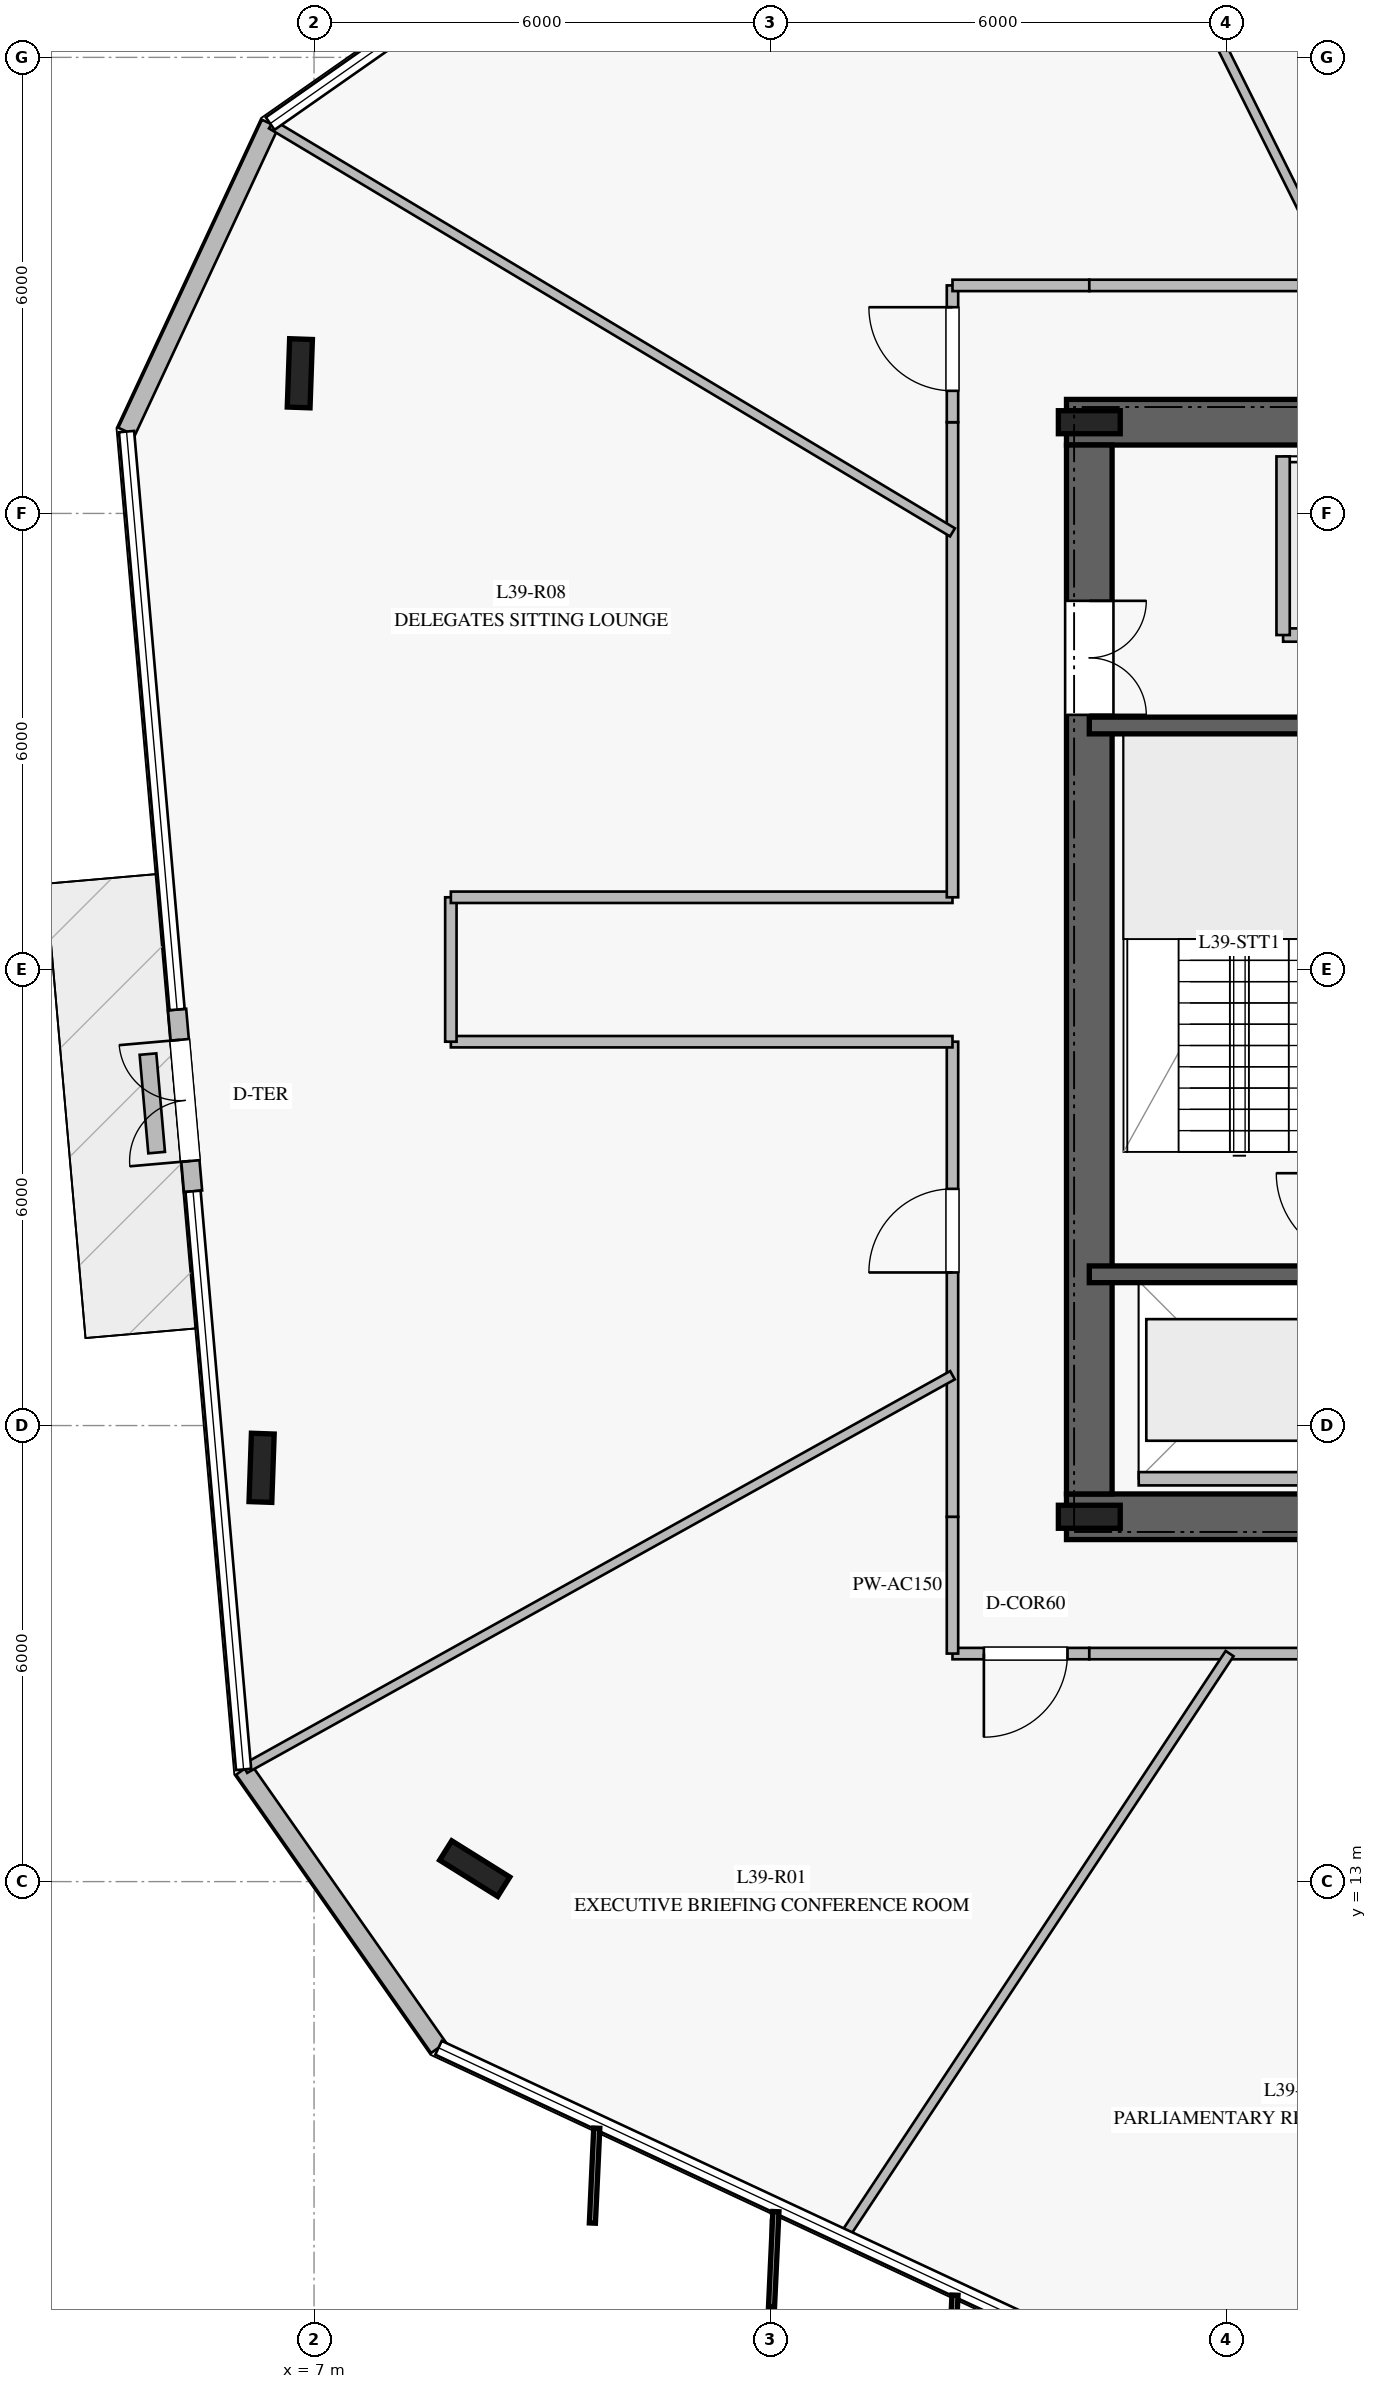
"""IFC4 building model, lengths in metres.
Left out: names, types, materials, properties, quantities, classifications, styles, units other than length and angle.
Written with IfcOpenShell. Run it as: python <this file> out.ifc"""

import sys

from ifc_helpers import new_model, si_unit, direction, frame, frame_2d, origin, origin_2d, place, context, subcontext, project, spatial, rectangle, i_section, extrude, element, fill, save


model = new_model("IFC4")
c1 = context("Model", 3, precision=1e-05, world=origin(), true_north=direction((0.0, 1.0)))
c2 = subcontext(c1, "Body", "Model", "MODEL_VIEW")
j1 = project(units=[si_unit("LENGTHUNIT", "METRE"), si_unit("PLANEANGLEUNIT", "RADIAN")], contexts=[c1])
p1 = place(None, origin())
s1 = spatial("IfcSite", under=j1, at=p1, CompositionType="ELEMENT")
p2 = place(p1, origin())
s2 = spatial("IfcBuilding", under=s1, at=p2, CompositionType="ELEMENT")
p3 = place(p2, frame((0.0, 0.0, 162.4)))
s3 = spatial("IfcBuildingStorey", under=s2, at=p3, CompositionType="ELEMENT", Elevation=162.4)
p4 = place(p3, frame((16.9, 17.8, 0.0), z_axis=(0.0, 0.0, 1.0), x_axis=(1.0, 0.0, 0.0)))
e1 = element("IfcWall", 1, at=p4, inside=s3, PredefinedType="SHEAR", context=c2, shape_type="SweptSolid", body=[
    extrude(rectangle(XDim=16.2, YDim=0.6, at=frame_2d((8.1, 0.0))), origin(), (0.0, 0.0, 1.0), 3.76),
])
p5 = place(p4, frame((5.05, 0.0, 0.0)))
e2 = element("IfcOpeningElement", 2, at=p5, cuts=e1, PredefinedType="OPENING", context=c2, shape_type="SweptSolid", body=[
    extrude(rectangle(XDim=1.2, YDim=2.25, at=frame_2d((0.6, 1.125))), frame((0.0, 0.31, 0.0), z_axis=(0.0, -1.0, 0.0), x_axis=(1.0, 0.0, 0.0)), (0.0, 0.0, 1.0), 0.62),
])
p6 = place(p4, frame((14.0, 0.0, 0.0)))
e3 = element("IfcOpeningElement", 3, at=p6, cuts=e1, PredefinedType="OPENING", context=c2, shape_type="SweptSolid", body=[
    extrude(rectangle(XDim=0.9, YDim=2.1, at=frame_2d((0.45, 1.05))), frame((0.0, 0.31, 0.0), z_axis=(0.0, -1.0, 0.0), x_axis=(1.0, 0.0, 0.0)), (0.0, 0.0, 1.0), 0.62),
])
p7 = place(p4, frame((9.25, 0.0, 0.0)))
e4 = element("IfcOpeningElement", 4, at=p7, cuts=e1, PredefinedType="OPENING", context=c2, shape_type="SweptSolid", body=[
    extrude(rectangle(XDim=1.1, YDim=2.2, at=frame_2d((0.55, 1.1))), frame((0.0, 0.31, 0.0), z_axis=(0.0, -1.0, 0.0), x_axis=(1.0, 0.0, 0.0)), (0.0, 0.0, 1.0), 0.62),
])
p8 = place(p3, frame((33.1, 32.2, 0.0), z_axis=(0.0, 0.0, 1.0), x_axis=(-1.0, 0.0, 0.0)))
e5 = element("IfcWall", 5, at=p8, inside=s3, PredefinedType="SHEAR", context=c2, shape_type="SweptSolid", body=[
    extrude(rectangle(XDim=16.2, YDim=0.6, at=frame_2d((8.1, 0.0))), origin(), (0.0, 0.0, 1.0), 3.76),
])
p9 = place(p8, frame((5.05, 0.0, 0.0)))
e6 = element("IfcOpeningElement", 6, at=p9, cuts=e5, PredefinedType="OPENING", context=c2, shape_type="SweptSolid", body=[
    extrude(rectangle(XDim=1.2, YDim=2.25, at=frame_2d((0.6, 1.125))), frame((0.0, 0.31, 0.0), z_axis=(0.0, -1.0, 0.0), x_axis=(1.0, 0.0, 0.0)), (0.0, 0.0, 1.0), 0.62),
])
p10 = place(p8, frame((11.85, 0.0, 0.0)))
e7 = element("IfcOpeningElement", 7, at=p10, cuts=e5, PredefinedType="OPENING", context=c2, shape_type="SweptSolid", body=[
    extrude(rectangle(XDim=1.1, YDim=2.2, at=frame_2d((0.55, 1.1))), frame((0.0, 0.31, 0.0), z_axis=(0.0, -1.0, 0.0), x_axis=(1.0, 0.0, 0.0)), (0.0, 0.0, 1.0), 0.62),
])
p11 = place(p8, frame((9.875, 0.0, 0.0)))
e8 = element("IfcOpeningElement", 8, at=p11, cuts=e5, PredefinedType="OPENING", context=c2, shape_type="SweptSolid", body=[
    extrude(rectangle(XDim=1.1, YDim=2.2, at=frame_2d((0.55, 1.1))), frame((0.0, 0.31, 0.0), z_axis=(0.0, -1.0, 0.0), x_axis=(1.0, 0.0, 0.0)), (0.0, 0.0, 1.0), 0.62),
])
p12 = place(p8, frame((7.9, 0.0, 0.0)))
e9 = element("IfcOpeningElement", 9, at=p12, cuts=e5, PredefinedType="OPENING", context=c2, shape_type="SweptSolid", body=[
    extrude(rectangle(XDim=1.1, YDim=2.2, at=frame_2d((0.55, 1.1))), frame((0.0, 0.31, 0.0), z_axis=(0.0, -1.0, 0.0), x_axis=(1.0, 0.0, 0.0)), (0.0, 0.0, 1.0), 0.62),
])
p13 = place(p3, frame((17.2, 31.9, 0.0), z_axis=(0.0, 0.0, 1.0), x_axis=(0.0, -1.0, 0.0)))
e10 = element("IfcWall", 10, at=p13, inside=s3, PredefinedType="SHEAR", context=c2, shape_type="SweptSolid", body=[
    extrude(rectangle(XDim=13.8, YDim=0.6, at=frame_2d((6.9, 0.0))), origin(), (0.0, 0.0, 1.0), 3.76),
])
p14 = place(p13, frame((2.05, 0.0, 0.0)))
e11 = element("IfcOpeningElement", 11, at=p14, cuts=e10, PredefinedType="OPENING", context=c2, shape_type="SweptSolid", body=[
    extrude(rectangle(XDim=1.5, YDim=2.2, at=frame_2d((0.75, 1.1))), frame((0.0, 0.31, 0.0), z_axis=(0.0, -1.0, 0.0), x_axis=(1.0, 0.0, 0.0)), (0.0, 0.0, 1.0), 0.62),
])
for number, where, z_axis, x_axis in (
    (12, (17.2, 17.8, 0.0), (0.0, 0.0, 1.0), (1.0, 0.0, 0.0)),
    (13, (17.2, 32.2, 0.0), (0.0, 0.0, 1.0), (1.0, 0.0, 0.0)),
):
    element("IfcColumn", number, at=place(p3, frame(where, z_axis=z_axis, x_axis=x_axis)), inside=s3, PredefinedType="COLUMN", context=c2, shape_type="SweptSolid", body=[
        extrude(i_section(OverallWidth=0.303, OverallDepth=0.814, WebThickness=0.021, FlangeThickness=0.04, at=origin_2d()), origin(), (0.0, 0.0, 1.0), 4.0),
    ])
for number, where, z_axis, x_axis in (
    (14, (17.2, 20.99, 0.0), (0.0, 0.0, 1.0), (1.0, 0.0, 0.0)),
    (15, (17.2, 28.21, 0.0), (0.0, 0.0, 1.0), (1.0, 0.0, 0.0)),
):
    element("IfcWall", number, at=place(p3, frame(where, z_axis=z_axis, x_axis=x_axis)), inside=s3, PredefinedType="SOLIDWALL", context=c2, shape_type="SweptSolid", body=[
        extrude(rectangle(XDim=3.72, YDim=0.22, at=frame_2d((1.86, 0.0))), origin(), (0.0, 0.0, 1.0), 3.76),
    ])
for number, where, z_axis, x_axis in (
    (16, (6.813, 32.844, 0.0), (0.0, 0.0, 1.0), (0.035, 0.999, 0.0)),
    (17, (6.31, 18.444, 0.0), (0.0, 0.0, 1.0), (0.035, 0.999, 0.0)),
    (18, (9.114, 13.171, 0.0), (0.0, 0.0, 1.0), (-0.848, 0.53, 0.0)),
):
    element("IfcColumn", number, at=place(p3, frame(where, z_axis=z_axis, x_axis=x_axis)), inside=s3, PredefinedType="COLUMN", context=c2, shape_type="SweptSolid", body=[
        extrude(i_section(OverallWidth=0.3, OverallDepth=0.9, WebThickness=0.019, FlangeThickness=0.035, at=origin_2d()), origin(), (0.0, 0.0, 1.0), 4.0),
    ])
p15 = place(p3, frame((6.423, 36.129, 0.0), z_axis=(0.0, 0.0, 1.0), x_axis=(-0.422738987368, -0.906251481962, 0.0)))
e19 = element("IfcWall", 19, at=p15, inside=s3, PredefinedType="STANDARD", context=c2, shape_type="SweptSolid", body=[
    extrude(rectangle(XDim=4.471, YDim=0.24, at=frame_2d((2.236, 0.0))), origin(), (0.0, 0.0, 1.0), 3.76),
])
p16 = place(p3, frame((5.198, 24.473, 0.0), z_axis=(0.0, 0.0, 1.0), x_axis=(0.087481150874, -0.996166175014, 0.0)))
e20 = element("IfcWall", 20, at=p16, inside=s3, PredefinedType="STANDARD", context=c2, shape_type="SweptSolid", body=[
    extrude(rectangle(XDim=2.4, YDim=0.24, at=frame_2d((1.2, 0.0))), origin(), (0.0, 0.0, 1.0), 3.76),
])
p17 = place(p16, frame((0.4, 0.0, 0.0)))
e21 = element("IfcOpeningElement", 21, at=p17, cuts=e20, PredefinedType="OPENING", context=c2, shape_type="SweptSolid", body=[
    extrude(rectangle(XDim=1.6, YDim=2.25, at=frame_2d((0.8, 1.125))), frame((0.0, 0.13, 0.0), z_axis=(0.0, -1.0, 0.0), x_axis=(1.0, 0.0, 0.0)), (0.0, 0.0, 1.0), 0.26),
])
p18 = place(p3, frame((6.073, 14.476, 0.0), z_axis=(0.0, 0.0, 1.0), x_axis=(0.57368221041, -0.819077970317, 0.0)))
e22 = element("IfcWall", 22, at=p18, inside=s3, PredefinedType="STANDARD", context=c2, shape_type="SweptSolid", body=[
    extrude(rectangle(XDim=4.471, YDim=0.24, at=frame_2d((2.235, 0.0))), origin(), (0.0, 0.0, 1.0), 3.76),
])
p19 = place(p3, frame((4.815, 23.887, 0.0), z_axis=(0.0, 0.0, 1.0), x_axis=(0.087641862602, -0.996152048595, 0.0)))
e23 = element("IfcWall", 23, at=p19, inside=s3, PredefinedType="USERDEFINED", context=c2, shape_type="SweptSolid", body=[
    extrude(rectangle(XDim=1.301, YDim=0.22, at=frame_2d((0.65, 0.0))), origin(), (0.0, 0.0, 1.0), 0.4),
])
p20 = place(p3, frame((19.75, 29.4, 0.0), z_axis=(0.0, 0.0, 1.0), x_axis=(1.0, 0.0, 0.0)))
e24 = element("IfcWall", 24, at=p20, inside=s3, PredefinedType="PARTITIONING", context=c2, shape_type="SweptSolid", body=[
    extrude(rectangle(XDim=1.9, YDim=0.175, at=frame_2d((0.95, 0.0))), origin(), (0.0, 0.0, 1.0), 3.76),
])
p21 = place(p3, frame((19.75, 29.4, 0.0), z_axis=(0.0, 0.0, 1.0), x_axis=(0.0, 1.0, 0.0)))
e25 = element("IfcWall", 25, at=p21, inside=s3, PredefinedType="PARTITIONING", context=c2, shape_type="SweptSolid", body=[
    extrude(rectangle(XDim=2.35, YDim=0.175, at=frame_2d((1.175, 0.0))), origin(), (0.0, 0.0, 1.0), 3.76),
])
p22 = place(p3, frame((17.85, 18.3, 0.0), z_axis=(0.0, 0.0, 1.0), x_axis=(1.0, 0.0, 0.0)))
e26 = element("IfcWall", 26, at=p22, inside=s3, PredefinedType="PARTITIONING", context=c2, shape_type="SweptSolid", body=[
    extrude(rectangle(XDim=2.6, YDim=0.175, at=frame_2d((1.3, 0.0))), origin(), (0.0, 0.0, 1.0), 3.76),
])
p23 = place(p3, frame((17.2, 16.0, 0.0), z_axis=(0.0, 0.0, 1.0), x_axis=(-1.0, 0.0, 0.0)))
e27 = element("IfcWall", 27, at=p23, inside=s3, PredefinedType="PARTITIONING", context=c2, shape_type="SweptSolid", body=[
    extrude(rectangle(XDim=1.8, YDim=0.15, at=frame_2d((0.9, 0.0))), origin(), (0.0, 0.0, 1.0), 3.36),
])
p24 = place(p23, frame((0.287, 0.0, 0.0)))
e28 = element("IfcOpeningElement", 28, at=p24, cuts=e27, PredefinedType="OPENING", context=c2, shape_type="SweptSolid", body=[
    extrude(rectangle(XDim=1.1, YDim=2.2, at=frame_2d((0.55, 1.1))), frame((0.0, 0.085, 0.0), z_axis=(0.0, -1.0, 0.0), x_axis=(1.0, 0.0, 0.0)), (0.0, 0.0, 1.0), 0.17),
])
p25 = place(p3, frame((15.4, 16.0, 0.0), z_axis=(0.0, 0.0, 1.0), x_axis=(0.0, 1.0, 0.0)))
e29 = element("IfcWall", 29, at=p25, inside=s3, PredefinedType="PARTITIONING", context=c2, shape_type="SweptSolid", body=[
    extrude(rectangle(XDim=1.8, YDim=0.15, at=frame_2d((0.9, 0.0))), origin(), (0.0, 0.0, 1.0), 3.21),
])
p26 = place(p3, frame((15.4, 17.8, 0.0), z_axis=(0.0, 0.0, 1.0), x_axis=(0.0, 1.0, 0.0)))
e30 = element("IfcWall", 30, at=p26, inside=s3, PredefinedType="PARTITIONING", context=c2, shape_type="SweptSolid", body=[
    extrude(rectangle(XDim=6.25, YDim=0.15, at=frame_2d((3.125, 0.0))), origin(), (0.0, 0.0, 1.0), 3.21),
])
p27 = place(p26, frame((3.214, 0.0, 0.0)))
e31 = element("IfcOpeningElement", 31, at=p27, cuts=e30, PredefinedType="OPENING", context=c2, shape_type="SweptSolid", body=[
    extrude(rectangle(XDim=1.1, YDim=2.2, at=frame_2d((0.55, 1.1))), frame((0.0, 0.085, 0.0), z_axis=(0.0, -1.0, 0.0), x_axis=(1.0, 0.0, 0.0)), (0.0, 0.0, 1.0), 0.17),
])
p28 = place(p3, frame((15.4, 24.05, 0.0), z_axis=(0.0, 0.0, 1.0), x_axis=(-1.0, 0.0, 0.0)))
e32 = element("IfcWall", 32, at=p28, inside=s3, PredefinedType="PARTITIONING", context=c2, shape_type="SweptSolid", body=[
    extrude(rectangle(XDim=6.6, YDim=0.15, at=frame_2d((3.3, 0.0))), origin(), (0.0, 0.0, 1.0), 3.05),
])
p29 = place(p3, frame((8.8, 24.05, 0.0), z_axis=(0.0, 0.0, 1.0), x_axis=(0.0, 1.0, 0.0)))
e33 = element("IfcWall", 33, at=p29, inside=s3, PredefinedType="PARTITIONING", context=c2, shape_type="SweptSolid", body=[
    extrude(rectangle(XDim=1.9, YDim=0.15, at=frame_2d((0.95, 0.0))), origin(), (0.0, 0.0, 1.0), 3.25),
])
p30 = place(p3, frame((8.8, 25.95, 0.0), z_axis=(0.0, 0.0, 1.0), x_axis=(1.0, 0.0, 0.0)))
e34 = element("IfcWall", 34, at=p30, inside=s3, PredefinedType="PARTITIONING", context=c2, shape_type="SweptSolid", body=[
    extrude(rectangle(XDim=6.6, YDim=0.15, at=frame_2d((3.3, 0.0))), origin(), (0.0, 0.0, 1.0), 3.05),
])
p31 = place(p3, frame((15.4, 25.95, 0.0), z_axis=(0.0, 0.0, 1.0), x_axis=(0.0, 1.0, 0.0)))
e35 = element("IfcWall", 35, at=p31, inside=s3, PredefinedType="PARTITIONING", context=c2, shape_type="SweptSolid", body=[
    extrude(rectangle(XDim=6.25, YDim=0.15, at=frame_2d((3.125, 0.0))), origin(), (0.0, 0.0, 1.0), 3.21),
])
p32 = place(p3, frame((15.4, 32.2, 0.0), z_axis=(0.0, 0.0, 1.0), x_axis=(0.0, 1.0, 0.0)))
e36 = element("IfcWall", 36, at=p32, inside=s3, PredefinedType="PARTITIONING", context=c2, shape_type="SweptSolid", body=[
    extrude(rectangle(XDim=1.8, YDim=0.15, at=frame_2d((0.9, 0.0))), origin(), (0.0, 0.0, 1.0), 3.21),
])
p33 = place(p32, frame((0.413, 0.0, 0.0)))
e37 = element("IfcOpeningElement", 37, at=p33, cuts=e36, PredefinedType="OPENING", context=c2, shape_type="SweptSolid", body=[
    extrude(rectangle(XDim=1.1, YDim=2.2, at=frame_2d((0.55, 1.1))), frame((0.0, 0.085, 0.0), z_axis=(0.0, -1.0, 0.0), x_axis=(1.0, 0.0, 0.0)), (0.0, 0.0, 1.0), 0.17),
])
p34 = place(p3, frame((15.4, 34.0, 0.0), z_axis=(0.0, 0.0, 1.0), x_axis=(1.0, 0.0, 0.0)))
e38 = element("IfcWall", 38, at=p34, inside=s3, PredefinedType="PARTITIONING", context=c2, shape_type="SweptSolid", body=[
    extrude(rectangle(XDim=1.8, YDim=0.15, at=frame_2d((0.9, 0.0))), origin(), (0.0, 0.0, 1.0), 3.76),
])
p35 = place(p3, frame((17.2, 34.0, 0.0), z_axis=(0.0, 0.0, 1.0), x_axis=(1.0, 0.0, 0.0)))
e39 = element("IfcWall", 39, at=p35, inside=s3, PredefinedType="PARTITIONING", context=c2, shape_type="SweptSolid", body=[
    extrude(rectangle(XDim=6.85, YDim=0.15, at=frame_2d((3.425, 0.0))), origin(), (0.0, 0.0, 1.0), 3.21),
])
p36 = place(p35, frame((4.33, 0.0, 0.0)))
e40 = element("IfcOpeningElement", 40, at=p36, cuts=e39, PredefinedType="OPENING", context=c2, shape_type="SweptSolid", body=[
    extrude(rectangle(XDim=1.1, YDim=2.2, at=frame_2d((0.55, 1.1))), frame((0.0, 0.085, 0.0), z_axis=(0.0, -1.0, 0.0), x_axis=(1.0, 0.0, 0.0)), (0.0, 0.0, 1.0), 0.17),
])
p37 = place(p3, frame((24.05, 16.0, 0.0), z_axis=(0.0, 0.0, 1.0), x_axis=(-1.0, 0.0, 0.0)))
e41 = element("IfcWall", 41, at=p37, inside=s3, PredefinedType="PARTITIONING", context=c2, shape_type="SweptSolid", body=[
    extrude(rectangle(XDim=6.85, YDim=0.15, at=frame_2d((3.425, 0.0))), origin(), (0.0, 0.0, 1.0), 3.21),
])
p38 = place(p3, frame((20.51, 34.0, 0.0), z_axis=(0.0, 0.0, 1.0), x_axis=(-0.446366409245, 0.894850282839, 0.0)))
e42 = element("IfcWall", 42, at=p38, inside=s3, PredefinedType="PARTITIONING", context=c2, shape_type="SweptSolid", body=[
    extrude(rectangle(XDim=9.916, YDim=0.125, at=frame_2d((4.958, 0.0))), origin(), (0.0, 0.0, 1.0), 3.16),
])
p39 = place(p3, frame((15.4, 30.751, 0.0), z_axis=(0.0, 0.0, 1.0), x_axis=(-0.857857730588, 0.513887258131, 0.0)))
e43 = element("IfcWall", 43, at=p39, inside=s3, PredefinedType="PARTITIONING", context=c2, shape_type="SweptSolid", body=[
    extrude(rectangle(XDim=10.446, YDim=0.125, at=frame_2d((5.223, 0.0))), origin(), (0.0, 0.0, 1.0), 3.16),
])
p40 = place(p3, frame((15.4, 19.662, 0.0), z_axis=(0.0, 0.0, 1.0), x_axis=(-0.873962612359, -0.48599316065, 0.0)))
e44 = element("IfcWall", 44, at=p40, inside=s3, PredefinedType="PARTITIONING", context=c2, shape_type="SweptSolid", body=[
    extrude(rectangle(XDim=10.652, YDim=0.125, at=frame_2d((5.326, 0.0))), origin(), (0.0, 0.0, 1.0), 3.16),
])
p41 = place(p3, frame((19.046, 16.0, 0.0), z_axis=(0.0, 0.0, 1.0), x_axis=(-0.551726848641, -0.834024870426, 0.0)))
e45 = element("IfcWall", 45, at=p41, inside=s3, PredefinedType="PARTITIONING", context=c2, shape_type="SweptSolid", body=[
    extrude(rectangle(XDim=9.182, YDim=0.125, at=frame_2d((4.591, 0.0))), origin(), (0.0, 0.0, 1.0), 3.16),
])
p42 = place(p17, frame((1.6, 0.0, 0.0), z_axis=(0.0, 0.0, 1.0), x_axis=(-1.0, 0.0, 0.0)))
e46 = element("IfcDoor", 46, at=p42, inside=s3, OperationType="DOUBLE_DOOR_SINGLE_SWING", PredefinedType="DOOR", context=c2, shape_type="SweptSolid", body=[
    extrude(rectangle(XDim=1.6, YDim=2.25, at=frame_2d((0.8, 1.125))), frame((0.0, 0.025, 0.0), z_axis=(0.0, -1.0, 0.0), x_axis=(1.0, 0.0, 0.0)), (0.0, 0.0, 1.0), 0.05),
])
fill(e21, e46)
p43 = place(p14, origin())
e47 = element("IfcDoor", 47, at=p43, inside=s3, OperationType="DOUBLE_DOOR_SINGLE_SWING", PredefinedType="DOOR", context=c2, shape_type="SweptSolid", body=[
    extrude(rectangle(XDim=1.5, YDim=2.2, at=frame_2d((0.75, 1.1))), frame((0.0, 0.025, 0.0), z_axis=(0.0, -1.0, 0.0), x_axis=(1.0, 0.0, 0.0)), (0.0, 0.0, 1.0), 0.05),
])
fill(e11, e47)
p44 = place(p24, origin())
e48 = element("IfcDoor", 48, at=p44, inside=s3, OperationType="SINGLE_SWING_RIGHT", PredefinedType="DOOR", context=c2, shape_type="SweptSolid", body=[
    extrude(rectangle(XDim=1.1, YDim=2.2, at=frame_2d((0.55, 1.1))), frame((0.0, 0.025, 0.0), z_axis=(0.0, -1.0, 0.0), x_axis=(1.0, 0.0, 0.0)), (0.0, 0.0, 1.0), 0.05),
])
fill(e28, e48)
p45 = place(p33, origin())
e49 = element("IfcDoor", 49, at=p45, inside=s3, OperationType="SINGLE_SWING_RIGHT", PredefinedType="DOOR", context=c2, shape_type="SweptSolid", body=[
    extrude(rectangle(XDim=1.1, YDim=2.2, at=frame_2d((0.55, 1.1))), frame((0.0, 0.025, 0.0), z_axis=(0.0, -1.0, 0.0), x_axis=(1.0, 0.0, 0.0)), (0.0, 0.0, 1.0), 0.05),
])
fill(e37, e49)
p46 = place(p27, origin())
e50 = element("IfcDoor", 50, at=p46, inside=s3, OperationType="SINGLE_SWING_LEFT", PredefinedType="DOOR", context=c2, shape_type="SweptSolid", body=[
    extrude(rectangle(XDim=1.1, YDim=2.2, at=frame_2d((0.55, 1.1))), frame((0.0, 0.025, 0.0), z_axis=(0.0, -1.0, 0.0), x_axis=(1.0, 0.0, 0.0)), (0.0, 0.0, 1.0), 0.05),
])
fill(e31, e50)
save(model, sys.argv[1])
